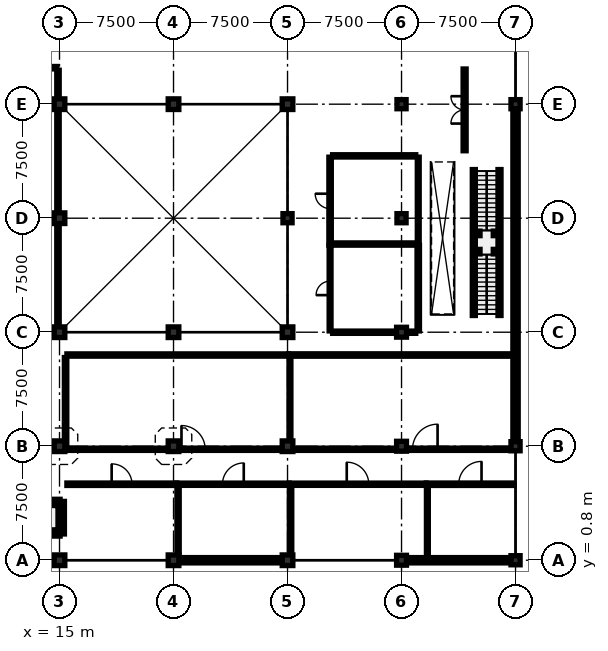
"""IFC4 building model, lengths in metres.
Left out: names, types, materials, properties, quantities, classifications, styles, units other than length and angle.
Written with IfcOpenShell. Run it as: python <this file> out.ifc"""

import sys

from ifc_helpers import new_model, si_unit, direction, frame, frame_2d, origin, origin_2d, place, context, subcontext, project, spatial, rectangle, i_section, extrude, element, fill, save


model = new_model("IFC4")
c1 = context("Model", 3, precision=1e-05, world=origin(), true_north=direction((0.0, 1.0)))
c2 = subcontext(c1, "Body", "Model", "MODEL_VIEW")
j1 = project(units=[si_unit("LENGTHUNIT", "METRE"), si_unit("PLANEANGLEUNIT", "RADIAN")], contexts=[c1])
p1 = place(None, origin())
s1 = spatial("IfcSite", under=j1, at=p1, CompositionType="ELEMENT")
p2 = place(p1, origin())
s2 = spatial("IfcBuilding", under=s1, at=p2, CompositionType="ELEMENT")
p3 = place(p2, frame((0.0, 0.0, 5.0)))
s3 = spatial("IfcBuildingStorey", under=s2, at=p3, CompositionType="ELEMENT", Elevation=5.0)
for number, where, z_axis, x_axis in (
    (1, (15.0, 0.8, 0.0), (0.0, 0.0, 1.0), (1.0, 0.0, 0.0)),
    (2, (15.0, 8.3, 0.0), (0.0, 0.0, 1.0), (1.0, 0.0, 0.0)),
    (3, (15.0, 15.8, 0.0), (0.0, 0.0, 1.0), (1.0, 0.0, 0.0)),
    (4, (15.0, 23.3, 0.0), (0.0, 0.0, 1.0), (1.0, 0.0, 0.0)),
    (5, (15.0, 30.8, 0.0), (0.0, 0.0, 1.0), (1.0, 0.0, 0.0)),
    (6, (22.5, 0.8, 0.0), (0.0, 0.0, 1.0), (1.0, 0.0, 0.0)),
    (7, (22.5, 8.3, 0.0), (0.0, 0.0, 1.0), (1.0, 0.0, 0.0)),
    (8, (22.5, 15.8, 0.0), (0.0, 0.0, 1.0), (1.0, 0.0, 0.0)),
    (9, (22.5, 30.8, 0.0), (0.0, 0.0, 1.0), (1.0, 0.0, 0.0)),
    (10, (30.0, 0.8, 0.0), (0.0, 0.0, 1.0), (1.0, 0.0, 0.0)),
    (11, (30.0, 8.3, 0.0), (0.0, 0.0, 1.0), (1.0, 0.0, 0.0)),
    (12, (30.0, 15.8, 0.0), (0.0, 0.0, 1.0), (1.0, 0.0, 0.0)),
):
    element("IfcColumn", number, at=place(p3, frame(where, z_axis=z_axis, x_axis=x_axis)), inside=s3, PredefinedType="COLUMN", context=c2, shape_type="SweptSolid", body=[
        extrude(rectangle(XDim=0.7, YDim=0.7, at=origin_2d()), origin(), (0.0, 0.0, 1.0), 4.2),
    ])
p4 = place(p3, frame((30.0, 23.3, 0.0), z_axis=(0.0, 0.0, 1.0), x_axis=(1.0, 0.0, 0.0)))
e13 = element("IfcColumn", 13, at=p4, inside=s3, PredefinedType="COLUMN", context=c2, shape_type="SweptSolid", body=[
    extrude(rectangle(XDim=0.6, YDim=0.6, at=origin_2d()), origin(), (0.0, 0.0, 1.0), 4.2),
])
p5 = place(p3, frame((30.0, 30.8, 0.0), z_axis=(0.0, 0.0, 1.0), x_axis=(1.0, 0.0, 0.0)))
e14 = element("IfcColumn", 14, at=p5, inside=s3, PredefinedType="COLUMN", context=c2, shape_type="SweptSolid", body=[
    extrude(rectangle(XDim=0.7, YDim=0.7, at=origin_2d()), origin(), (0.0, 0.0, 1.0), 4.2),
])
for number, where, z_axis, x_axis in (
    (15, (37.5, 0.8, 0.0), (0.0, 0.0, 1.0), (1.0, 0.0, 0.0)),
    (16, (37.5, 8.3, 0.0), (0.0, 0.0, 1.0), (1.0, 0.0, 0.0)),
    (17, (37.5, 15.8, 0.0), (0.0, 0.0, 1.0), (1.0, 0.0, 0.0)),
):
    element("IfcColumn", number, at=place(p3, frame(where, z_axis=z_axis, x_axis=x_axis)), inside=s3, PredefinedType="COLUMN", context=c2, shape_type="SweptSolid", body=[
        extrude(rectangle(XDim=0.65, YDim=0.65, at=origin_2d()), origin(), (0.0, 0.0, 1.0), 4.2),
    ])
for number, where, z_axis, x_axis in (
    (18, (37.5, 23.3, 0.0), (0.0, 0.0, 1.0), (1.0, 0.0, 0.0)),
    (19, (37.5, 30.8, 0.0), (0.0, 0.0, 1.0), (1.0, 0.0, 0.0)),
    (20, (45.0, 0.8, 0.0), (0.0, 0.0, 1.0), (1.0, 0.0, 0.0)),
    (21, (45.0, 8.3, 0.0), (0.0, 0.0, 1.0), (1.0, 0.0, 0.0)),
    (22, (45.0, 30.8, 0.0), (0.0, 0.0, 1.0), (1.0, 0.0, 0.0)),
):
    element("IfcColumn", number, at=place(p3, frame(where, z_axis=z_axis, x_axis=x_axis)), inside=s3, PredefinedType="COLUMN", context=c2, shape_type="SweptSolid", body=[
        extrude(rectangle(XDim=0.6, YDim=0.6, at=origin_2d()), origin(), (0.0, 0.0, 1.0), 4.2),
    ])
p6 = place(p3, frame((45.0, 30.5, 0.0), z_axis=(0.0, 0.0, 1.0), x_axis=(0.0, -1.0, 0.0)))
e23 = element("IfcWall", 23, at=p6, inside=s3, PredefinedType="SOLIDWALL", context=c2, shape_type="SweptSolid", body=[
    extrude(rectangle(XDim=21.9, YDim=0.35, at=frame_2d((10.95, 0.0))), origin(), (0.0, 0.0, 1.0), 3.485),
])
p7 = place(p3, frame((44.7, 0.8, 0.0), z_axis=(0.0, 0.0, 1.0), x_axis=(-1.0, 0.0, 0.0)))
e24 = element("IfcWall", 24, at=p7, inside=s3, PredefinedType="SOLIDWALL", context=c2, shape_type="SweptSolid", body=[
    extrude(rectangle(XDim=6.875, YDim=0.35, at=frame_2d((3.438, 0.0))), origin(), (0.0, 0.0, 1.0), 3.485),
])
p8 = place(p3, frame((29.65, 0.8, 0.0), z_axis=(0.0, 0.0, 1.0), x_axis=(-1.0, 0.0, 0.0)))
e25 = element("IfcWall", 25, at=p8, inside=s3, PredefinedType="SOLIDWALL", context=c2, shape_type="SweptSolid", body=[
    extrude(rectangle(XDim=6.8, YDim=0.35, at=frame_2d((3.4, 0.0))), origin(), (0.0, 0.0, 1.0), 3.535),
])
p9 = place(p3, frame((14.65, 0.8, 0.0), z_axis=(0.0, 0.0, 1.0), x_axis=(-1.0, 0.0, 0.0)))
e26 = element("IfcWall", 26, at=p9, inside=s3, PredefinedType="SOLIDWALL", context=c2, shape_type="SweptSolid", body=[
    extrude(rectangle(XDim=6.8, YDim=0.35, at=frame_2d((3.4, 0.0))), origin(), (0.0, 0.0, 1.0), 3.535),
])
p10 = place(p9, frame((2.6, 0.0, 0.9)))
e27 = element("IfcOpeningElement", 27, at=p10, cuts=e26, PredefinedType="OPENING", context=c2, shape_type="SweptSolid", body=[
    extrude(rectangle(XDim=1.6, YDim=1.7, at=frame_2d((0.8, 0.85))), frame((0.0, 0.187, 0.0), z_axis=(0.0, -1.0, 0.0), x_axis=(1.0, 0.0, 0.0)), (0.0, 0.0, 1.0), 0.374),
])
p11 = place(p3, frame((12.928, 2.529, 0.0), z_axis=(0.0, 0.0, 1.0), x_axis=(1.0, 0.0, 0.0)))
e28 = element("IfcWall", 28, at=p11, inside=s3, PredefinedType="SHEAR", context=c2, shape_type="SweptSolid", body=[
    extrude(rectangle(XDim=2.11, YDim=0.28, at=frame_2d((1.055, 0.0))), origin(), (0.0, 0.0, 1.0), 4.2),
])
p12 = place(p3, frame((15.184, 2.529, 0.0), z_axis=(0.0, 0.0, 1.0), x_axis=(0.0, 1.0, 0.0)))
e29 = element("IfcWall", 29, at=p12, inside=s3, PredefinedType="SHEAR", context=c2, shape_type="SweptSolid", body=[
    extrude(rectangle(XDim=2.141, YDim=0.28, at=frame_2d((1.071, 0.0))), origin(), (0.0, 0.0, 1.0), 4.2),
])
p13 = place(p3, frame((15.039, 4.671, 0.0), z_axis=(0.0, 0.0, 1.0), x_axis=(-1.0, 0.0, 0.0)))
e30 = element("IfcWall", 30, at=p13, inside=s3, PredefinedType="SHEAR", context=c2, shape_type="SweptSolid", body=[
    extrude(rectangle(XDim=2.11, YDim=0.28, at=frame_2d((1.055, 0.0))), origin(), (0.0, 0.0, 1.0), 4.2),
])
p14 = place(p13, frame((0.505, 0.0, 0.0)))
e31 = element("IfcOpeningElement", 31, at=p14, cuts=e30, PredefinedType="OPENING", context=c2, shape_type="SweptSolid", body=[
    extrude(rectangle(XDim=1.1, YDim=2.15, at=frame_2d((0.55, 1.075))), frame((0.0, 0.152, 0.0), z_axis=(0.0, -1.0, 0.0), x_axis=(1.0, 0.0, 0.0)), (0.0, 0.0, 1.0), 0.304),
])
for number, where, z_axis, x_axis in (
    (32, (42.255, 16.9, 0.0), (0.0, 0.0, 1.0), (0.0, 1.0, 0.0)),
    (33, (43.945, 16.9, 0.0), (0.0, 0.0, 1.0), (0.0, 1.0, 0.0)),
):
    element("IfcWall", number, at=place(p3, frame(where, z_axis=z_axis, x_axis=x_axis)), inside=s3, PredefinedType="PARTITIONING", context=c2, shape_type="SweptSolid", body=[
        extrude(rectangle(XDim=9.6, YDim=0.2, at=frame_2d((4.8, 0.0))), origin(), (0.0, 0.0, 1.0), 4.2),
    ])
for number, where, z_axis, x_axis in (
    (34, (42.515, 21.1, 0.0), (0.0, 0.0, 1.0), (1.0, 0.0, 0.0)),
    (35, (43.685, 21.1, 0.0), (0.0, 0.0, 1.0), (1.0, 0.0, 0.0)),
    (36, (43.685, 22.3, 0.0), (0.0, 0.0, 1.0), (1.0, 0.0, 0.0)),
    (37, (42.515, 22.3, 0.0), (0.0, 0.0, 1.0), (1.0, 0.0, 0.0)),
):
    element("IfcColumn", number, at=place(p3, frame(where, z_axis=z_axis, x_axis=x_axis)), inside=s3, PredefinedType="COLUMN", context=c2, shape_type="SweptSolid", body=[
        extrude(i_section(OverallWidth=0.3, OverallDepth=0.3, WebThickness=0.011, FlangeThickness=0.019, FilletRadius=0.027, at=origin_2d()), origin(), (0.0, 0.0, 1.0), 2.05),
    ])
p15 = place(p3, frame((15.485, 5.8, 0.0), z_axis=(0.0, 0.0, 1.0), x_axis=(1.0, 0.0, 0.0)))
e38 = element("IfcWall", 38, at=p15, inside=s3, PredefinedType="PARTITIONING", context=c2, shape_type="SweptSolid", body=[
    extrude(rectangle(XDim=7.23, YDim=0.16, at=frame_2d((3.615, 0.0))), origin(), (0.0, 0.0, 1.0), 3.265),
])
p16 = place(p15, frame((2.945, 0.0, 0.0)))
e39 = element("IfcOpeningElement", 39, at=p16, cuts=e38, PredefinedType="OPENING", context=c2, shape_type="SweptSolid", body=[
    extrude(rectangle(XDim=1.34, YDim=2.24, at=frame_2d((0.67, 1.12))), frame((0.0, 0.092, 0.0), z_axis=(0.0, -1.0, 0.0), x_axis=(1.0, 0.0, 0.0)), (0.0, 0.0, 1.0), 0.184),
])
p17 = place(p3, frame((22.727, 5.8, 0.0), z_axis=(0.0, 0.0, 1.0), x_axis=(1.0, 0.0, 0.0)))
e40 = element("IfcWall", 40, at=p17, inside=s3, PredefinedType="PARTITIONING", context=c2, shape_type="SweptSolid", body=[
    extrude(rectangle(XDim=7.388, YDim=0.15, at=frame_2d((3.694, 0.0))), origin(), (0.0, 0.0, 1.0), 3.265),
])
p18 = place(p17, frame((2.994, 0.0, 0.0)))
e41 = element("IfcOpeningElement", 41, at=p18, cuts=e40, PredefinedType="OPENING", context=c2, shape_type="SweptSolid", body=[
    extrude(rectangle(XDim=1.4, YDim=2.25, at=frame_2d((0.7, 1.125))), frame((0.0, 0.087, 0.0), z_axis=(0.0, -1.0, 0.0), x_axis=(1.0, 0.0, 0.0)), (0.0, 0.0, 1.0), 0.174),
])
p19 = place(p3, frame((30.127, 5.8, 0.0), z_axis=(0.0, 0.0, 1.0), x_axis=(1.0, 0.0, 0.0)))
e42 = element("IfcWall", 42, at=p19, inside=s3, PredefinedType="PARTITIONING", context=c2, shape_type="SweptSolid", body=[
    extrude(rectangle(XDim=8.988, YDim=0.15, at=frame_2d((4.494, 0.0))), origin(), (0.0, 0.0, 1.0), 3.485),
])
p20 = place(p19, frame((3.769, 0.0, 0.0)))
e43 = element("IfcOpeningElement", 43, at=p20, cuts=e42, PredefinedType="OPENING", context=c2, shape_type="SweptSolid", body=[
    extrude(rectangle(XDim=1.45, YDim=2.26, at=frame_2d((0.725, 1.13))), frame((0.0, 0.087, 0.0), z_axis=(0.0, -1.0, 0.0), x_axis=(1.0, 0.0, 0.0)), (0.0, 0.0, 1.0), 0.174),
])
p21 = place(p3, frame((39.127, 5.8, 0.0), z_axis=(0.0, 0.0, 1.0), x_axis=(1.0, 0.0, 0.0)))
e44 = element("IfcWall", 44, at=p21, inside=s3, PredefinedType="PARTITIONING", context=c2, shape_type="SweptSolid", body=[
    extrude(rectangle(XDim=5.771, YDim=0.16, at=frame_2d((2.885, 0.0))), origin(), (0.0, 0.0, 1.0), 3.535),
])
p22 = place(p21, frame((2.135, 0.0, 0.0)))
e45 = element("IfcOpeningElement", 45, at=p22, cuts=e44, PredefinedType="OPENING", context=c2, shape_type="SweptSolid", body=[
    extrude(rectangle(XDim=1.5, YDim=2.28, at=frame_2d((0.75, 1.14))), frame((0.0, 0.092, 0.0), z_axis=(0.0, -1.0, 0.0), x_axis=(1.0, 0.0, 0.0)), (0.0, 0.0, 1.0), 0.184),
])
p23 = place(p3, frame((15.362, 8.1, 0.0), z_axis=(0.0, 0.0, 1.0), x_axis=(1.0, 0.0, 0.0)))
e46 = element("IfcWall", 46, at=p23, inside=s3, PredefinedType="PARTITIONING", context=c2, shape_type="SweptSolid", body=[
    extrude(rectangle(XDim=14.546, YDim=0.15, at=frame_2d((7.273, 0.0))), origin(), (0.0, 0.0, 1.0), 3.265),
])
p24 = place(p23, frame((7.662, 0.0, 0.0)))
e47 = element("IfcOpeningElement", 47, at=p24, cuts=e46, PredefinedType="OPENING", context=c2, shape_type="SweptSolid", body=[
    extrude(rectangle(XDim=1.56, YDim=2.3, at=frame_2d((0.78, 1.15))), frame((0.0, 0.087, 0.0), z_axis=(0.0, -1.0, 0.0), x_axis=(1.0, 0.0, 0.0)), (0.0, 0.0, 1.0), 0.174),
])
p25 = place(p3, frame((30.362, 8.1, 0.0), z_axis=(0.0, 0.0, 1.0), x_axis=(1.0, 0.0, 0.0)))
e48 = element("IfcWall", 48, at=p25, inside=s3, PredefinedType="PARTITIONING", context=c2, shape_type="SweptSolid", body=[
    extrude(rectangle(XDim=14.326, YDim=0.15, at=frame_2d((7.163, 0.0))), origin(), (0.0, 0.0, 1.0), 3.485),
])
p26 = place(p25, frame((7.859, 0.0, 0.0)))
e49 = element("IfcOpeningElement", 49, at=p26, cuts=e48, PredefinedType="OPENING", context=c2, shape_type="SweptSolid", body=[
    extrude(rectangle(XDim=1.65, YDim=2.32, at=frame_2d((0.825, 1.16))), frame((0.0, 0.087, 0.0), z_axis=(0.0, -1.0, 0.0), x_axis=(1.0, 0.0, 0.0)), (0.0, 0.0, 1.0), 0.174),
])
p27 = place(p3, frame((12.485, 33.2, 0.0), z_axis=(0.0, 0.0, 1.0), x_axis=(1.0, 0.0, 0.0)))
e50 = element("IfcWall", 50, at=p27, inside=s3, PredefinedType="PARTITIONING", context=c2, shape_type="SweptSolid", body=[
    extrude(rectangle(XDim=2.33, YDim=0.16, at=frame_2d((1.165, 0.0))), origin(), (0.0, 0.0, 1.0), 3.265),
])
p28 = place(p27, frame((0.665, 0.0, 0.0)))
e51 = element("IfcOpeningElement", 51, at=p28, cuts=e50, PredefinedType="OPENING", context=c2, shape_type="SweptSolid", body=[
    extrude(rectangle(XDim=1.0, YDim=2.22, at=frame_2d((0.5, 1.11))), frame((0.0, 0.092, 0.0), z_axis=(0.0, -1.0, 0.0), x_axis=(1.0, 0.0, 0.0)), (0.0, 0.0, 1.0), 0.184),
])
p29 = place(p3, frame((41.65, 27.735, 0.0), z_axis=(0.0, 0.0, 1.0), x_axis=(0.0, 1.0, 0.0)))
e52 = element("IfcWall", 52, at=p29, inside=s3, PredefinedType="PARTITIONING", context=c2, shape_type="SweptSolid", body=[
    extrude(rectangle(XDim=5.38, YDim=0.2, at=frame_2d((2.69, 0.0))), origin(), (0.0, 0.0, 1.0), 3.485),
])
p30 = place(p29, frame((1.79, 0.0, 0.0)))
e53 = element("IfcOpeningElement", 53, at=p30, cuts=e52, PredefinedType="OPENING", context=c2, shape_type="SweptSolid", body=[
    extrude(rectangle(XDim=1.8, YDim=2.15, at=frame_2d((0.9, 1.075))), frame((0.0, 0.112, 0.0), z_axis=(0.0, -1.0, 0.0), x_axis=(1.0, 0.0, 0.0)), (0.0, 0.0, 1.0), 0.224),
])
p31 = place(p3, frame((32.8, 15.885, 0.0), z_axis=(0.0, 0.0, 1.0), x_axis=(0.0, 1.0, 0.0)))
e54 = element("IfcWall", 54, at=p31, inside=s3, PredefinedType="PARTITIONING", context=c2, shape_type="SweptSolid", body=[
    extrude(rectangle(XDim=5.63, YDim=0.125, at=frame_2d((2.815, 0.0))), origin(), (0.0, 0.0, 1.0), 3.485),
])
p32 = place(p31, frame((2.355, 0.0, 0.0)))
e55 = element("IfcOpeningElement", 55, at=p32, cuts=e54, PredefinedType="OPENING", context=c2, shape_type="SweptSolid", body=[
    extrude(rectangle(XDim=0.92, YDim=2.1, at=frame_2d((0.46, 1.05))), frame((0.0, 0.074, 0.0), z_axis=(0.0, -1.0, 0.0), x_axis=(1.0, 0.0, 0.0)), (0.0, 0.0, 1.0), 0.149),
])
p33 = place(p3, frame((32.8, 21.527, 0.0), z_axis=(0.0, 0.0, 1.0), x_axis=(0.0, 1.0, 0.0)))
e56 = element("IfcWall", 56, at=p33, inside=s3, PredefinedType="PARTITIONING", context=c2, shape_type="SweptSolid", body=[
    extrude(rectangle(XDim=5.788, YDim=0.16, at=frame_2d((2.894, 0.0))), origin(), (0.0, 0.0, 1.0), 3.485),
])
p34 = place(p33, frame((2.404, 0.0, 0.0)))
e57 = element("IfcOpeningElement", 57, at=p34, cuts=e56, PredefinedType="OPENING", context=c2, shape_type="SweptSolid", body=[
    extrude(rectangle(XDim=0.98, YDim=2.12, at=frame_2d((0.49, 1.06))), frame((0.0, 0.092, 0.0), z_axis=(0.0, -1.0, 0.0), x_axis=(1.0, 0.0, 0.0)), (0.0, 0.0, 1.0), 0.184),
])
p35 = place(p3, frame((15.485, 14.3, 0.0), z_axis=(0.0, 0.0, 1.0), x_axis=(1.0, 0.0, 0.0)))
e58 = element("IfcWall", 58, at=p35, inside=s3, PredefinedType="PARTITIONING", context=c2, shape_type="SweptSolid", body=[
    extrude(rectangle(XDim=14.59, YDim=0.15, at=frame_2d((7.295, 0.0))), origin(), (0.0, 0.0, 1.0), 3.265),
])
p36 = place(p3, frame((30.087, 14.3, 0.0), z_axis=(0.0, 0.0, 1.0), x_axis=(1.0, 0.0, 0.0)))
e59 = element("IfcWall", 59, at=p36, inside=s3, PredefinedType="PARTITIONING", context=c2, shape_type="SweptSolid", body=[
    extrude(rectangle(XDim=14.726, YDim=0.16, at=frame_2d((7.363, 0.0))), origin(), (0.0, 0.0, 1.0), 3.485),
])
p37 = place(p3, frame((12.485, 15.8, 0.0), z_axis=(0.0, 0.0, 1.0), x_axis=(1.0, 0.0, 0.0)))
e60 = element("IfcWall", 60, at=p37, inside=s3, PredefinedType="PARTITIONING", context=c2, shape_type="SweptSolid", body=[
    extrude(rectangle(XDim=2.163, YDim=0.15, at=frame_2d((1.082, 0.0))), origin(), (0.0, 0.0, 1.0), 3.265),
])
p38 = place(p3, frame((38.6, 15.885, 0.0), z_axis=(0.0, 0.0, 1.0), x_axis=(0.0, 1.0, 0.0)))
e61 = element("IfcWall", 61, at=p38, inside=s3, PredefinedType="PARTITIONING", context=c2, shape_type="SweptSolid", body=[
    extrude(rectangle(XDim=5.63, YDim=0.16, at=frame_2d((2.815, 0.0))), origin(), (0.0, 0.0, 1.0), 4.2),
])
p39 = place(p3, frame((38.6, 21.527, 0.0), z_axis=(0.0, 0.0, 1.0), x_axis=(0.0, 1.0, 0.0)))
e62 = element("IfcWall", 62, at=p39, inside=s3, PredefinedType="PARTITIONING", context=c2, shape_type="SweptSolid", body=[
    extrude(rectangle(XDim=5.788, YDim=0.125, at=frame_2d((2.894, 0.0))), origin(), (0.0, 0.0, 1.0), 4.2),
])
p40 = place(p3, frame((22.8, 1.162, 0.0), z_axis=(0.0, 0.0, 1.0), x_axis=(0.0, 1.0, 0.0)))
e63 = element("IfcWall", 63, at=p40, inside=s3, PredefinedType="PARTITIONING", context=c2, shape_type="SweptSolid", body=[
    extrude(rectangle(XDim=4.551, YDim=0.15, at=frame_2d((2.275, 0.0))), origin(), (0.0, 0.0, 1.0), 3.265),
])
p41 = place(p3, frame((30.2, 1.162, 0.0), z_axis=(0.0, 0.0, 1.0), x_axis=(0.0, 1.0, 0.0)))
e64 = element("IfcWall", 64, at=p41, inside=s3, PredefinedType="PARTITIONING", context=c2, shape_type="SweptSolid", body=[
    extrude(rectangle(XDim=4.551, YDim=0.16, at=frame_2d((2.275, 0.0))), origin(), (0.0, 0.0, 1.0), 3.485),
])
p42 = place(p3, frame((39.2, 0.987, 0.0), z_axis=(0.0, 0.0, 1.0), x_axis=(0.0, 1.0, 0.0)))
e65 = element("IfcWall", 65, at=p42, inside=s3, PredefinedType="PARTITIONING", context=c2, shape_type="SweptSolid", body=[
    extrude(rectangle(XDim=4.721, YDim=0.125, at=frame_2d((2.36, 0.0))), origin(), (0.0, 0.0, 1.0), 3.535),
])
p43 = place(p3, frame((15.4, 8.187, 0.0), z_axis=(0.0, 0.0, 1.0), x_axis=(0.0, 1.0, 0.0)))
e66 = element("IfcWall", 66, at=p43, inside=s3, PredefinedType="PARTITIONING", context=c2, shape_type="SweptSolid", body=[
    extrude(rectangle(XDim=5.948, YDim=0.16, at=frame_2d((2.974, 0.0))), origin(), (0.0, 0.0, 1.0), 3.265),
])
p44 = place(p3, frame((30.16, 8.432, 0.0), z_axis=(0.0, 0.0, 1.0), x_axis=(0.0, 1.0, 0.0)))
e67 = element("IfcWall", 67, at=p44, inside=s3, PredefinedType="PARTITIONING", context=c2, shape_type="SweptSolid", body=[
    extrude(rectangle(XDim=5.776, YDim=0.125, at=frame_2d((2.888, 0.0))), origin(), (0.0, 0.0, 1.0), 3.485),
])
p45 = place(p3, frame((14.9, 16.132, 0.0), z_axis=(0.0, 0.0, 1.0), x_axis=(0.0, 1.0, 0.0)))
e68 = element("IfcWall", 68, at=p45, inside=s3, PredefinedType="PARTITIONING", context=c2, shape_type="SweptSolid", body=[
    extrude(rectangle(XDim=16.903, YDim=0.16, at=frame_2d((8.451, 0.0))), origin(), (0.0, 0.0, 1.0), 3.265),
])
p46 = place(p3, frame((32.965, 15.8, 0.0), z_axis=(0.0, 0.0, 1.0), x_axis=(1.0, 0.0, 0.0)))
e69 = element("IfcWall", 69, at=p46, inside=s3, PredefinedType="PARTITIONING", context=c2, shape_type="SweptSolid", body=[
    extrude(rectangle(XDim=5.47, YDim=0.15, at=frame_2d((2.735, 0.0))), origin(), (0.0, 0.0, 1.0), 3.485),
])
p47 = place(p3, frame((32.892, 21.6, 0.0), z_axis=(0.0, 0.0, 1.0), x_axis=(1.0, 0.0, 0.0)))
e70 = element("IfcWall", 70, at=p47, inside=s3, PredefinedType="PARTITIONING", context=c2, shape_type="SweptSolid", body=[
    extrude(rectangle(XDim=5.633, YDim=0.15, at=frame_2d((2.817, 0.0))), origin(), (0.0, 0.0, 1.0), 3.485),
])
p48 = place(p3, frame((32.965, 27.4, 0.0), z_axis=(0.0, 0.0, 1.0), x_axis=(1.0, 0.0, 0.0)))
e71 = element("IfcWall", 71, at=p48, inside=s3, PredefinedType="PARTITIONING", context=c2, shape_type="SweptSolid", body=[
    extrude(rectangle(XDim=5.47, YDim=0.15, at=frame_2d((2.735, 0.0))), origin(), (0.0, 0.0, 1.0), 3.485),
])
p49 = place(p14, origin())
e72 = element("IfcDoor", 72, at=p49, inside=s3, OperationType="SLIDING_TO_RIGHT", PredefinedType="DOOR", context=c2, shape_type="SweptSolid", body=[
    extrude(rectangle(XDim=1.1, YDim=2.15, at=frame_2d((0.55, 1.075))), frame((0.0, 0.025, 0.0), z_axis=(0.0, -1.0, 0.0), x_axis=(1.0, 0.0, 0.0)), (0.0, 0.0, 1.0), 0.05),
])
fill(e31, e72)
p50 = place(p16, origin())
e73 = element("IfcDoor", 73, at=p50, inside=s3, OperationType="SINGLE_SWING_LEFT", PredefinedType="DOOR", context=c2, shape_type="SweptSolid", body=[
    extrude(rectangle(XDim=1.34, YDim=2.24, at=frame_2d((0.67, 1.12))), frame((0.0, 0.025, 0.0), z_axis=(0.0, -1.0, 0.0), x_axis=(1.0, 0.0, 0.0)), (0.0, 0.0, 1.0), 0.05),
])
fill(e39, e73)
p51 = place(p18, origin())
e74 = element("IfcDoor", 74, at=p51, inside=s3, OperationType="SINGLE_SWING_RIGHT", PredefinedType="DOOR", context=c2, shape_type="SweptSolid", body=[
    extrude(rectangle(XDim=1.4, YDim=2.25, at=frame_2d((0.7, 1.125))), frame((0.0, 0.025, 0.0), z_axis=(0.0, -1.0, 0.0), x_axis=(1.0, 0.0, 0.0)), (0.0, 0.0, 1.0), 0.05),
])
fill(e41, e74)
p52 = place(p20, origin())
e75 = element("IfcDoor", 75, at=p52, inside=s3, OperationType="SINGLE_SWING_LEFT", PredefinedType="DOOR", context=c2, shape_type="SweptSolid", body=[
    extrude(rectangle(XDim=1.45, YDim=2.26, at=frame_2d((0.725, 1.13))), frame((0.0, 0.025, 0.0), z_axis=(0.0, -1.0, 0.0), x_axis=(1.0, 0.0, 0.0)), (0.0, 0.0, 1.0), 0.05),
])
fill(e43, e75)
p53 = place(p22, origin())
e76 = element("IfcDoor", 76, at=p53, inside=s3, OperationType="SINGLE_SWING_RIGHT", PredefinedType="DOOR", context=c2, shape_type="SweptSolid", body=[
    extrude(rectangle(XDim=1.5, YDim=2.28, at=frame_2d((0.75, 1.14))), frame((0.0, 0.025, 0.0), z_axis=(0.0, -1.0, 0.0), x_axis=(1.0, 0.0, 0.0)), (0.0, 0.0, 1.0), 0.05),
])
fill(e45, e76)
p54 = place(p24, origin())
e77 = element("IfcDoor", 77, at=p54, inside=s3, OperationType="SINGLE_SWING_LEFT", PredefinedType="DOOR", context=c2, shape_type="SweptSolid", body=[
    extrude(rectangle(XDim=1.56, YDim=2.3, at=frame_2d((0.78, 1.15))), frame((0.0, 0.025, 0.0), z_axis=(0.0, -1.0, 0.0), x_axis=(1.0, 0.0, 0.0)), (0.0, 0.0, 1.0), 0.05),
])
fill(e47, e77)
p55 = place(p26, origin())
e78 = element("IfcDoor", 78, at=p55, inside=s3, OperationType="SINGLE_SWING_RIGHT", PredefinedType="DOOR", context=c2, shape_type="SweptSolid", body=[
    extrude(rectangle(XDim=1.65, YDim=2.32, at=frame_2d((0.825, 1.16))), frame((0.0, 0.025, 0.0), z_axis=(0.0, -1.0, 0.0), x_axis=(1.0, 0.0, 0.0)), (0.0, 0.0, 1.0), 0.05),
])
fill(e49, e78)
p56 = place(p30, origin())
e79 = element("IfcDoor", 79, at=p56, inside=s3, OperationType="DOUBLE_DOOR_SINGLE_SWING", PredefinedType="DOOR", context=c2, shape_type="SweptSolid", body=[
    extrude(rectangle(XDim=1.8, YDim=2.15, at=frame_2d((0.9, 1.075))), frame((0.0, 0.025, 0.0), z_axis=(0.0, -1.0, 0.0), x_axis=(1.0, 0.0, 0.0)), (0.0, 0.0, 1.0), 0.05),
])
fill(e53, e79)
p57 = place(p32, origin())
e80 = element("IfcDoor", 80, at=p57, inside=s3, OperationType="SINGLE_SWING_LEFT", PredefinedType="DOOR", context=c2, shape_type="SweptSolid", body=[
    extrude(rectangle(XDim=0.92, YDim=2.1, at=frame_2d((0.46, 1.05))), frame((0.0, 0.025, 0.0), z_axis=(0.0, -1.0, 0.0), x_axis=(1.0, 0.0, 0.0)), (0.0, 0.0, 1.0), 0.05),
])
fill(e55, e80)
p58 = place(p34, origin())
e81 = element("IfcDoor", 81, at=p58, inside=s3, OperationType="SINGLE_SWING_RIGHT", PredefinedType="DOOR", context=c2, shape_type="SweptSolid", body=[
    extrude(rectangle(XDim=0.98, YDim=2.12, at=frame_2d((0.49, 1.06))), frame((0.0, 0.025, 0.0), z_axis=(0.0, -1.0, 0.0), x_axis=(1.0, 0.0, 0.0)), (0.0, 0.0, 1.0), 0.05),
])
fill(e57, e81)
save(model, sys.argv[1])
